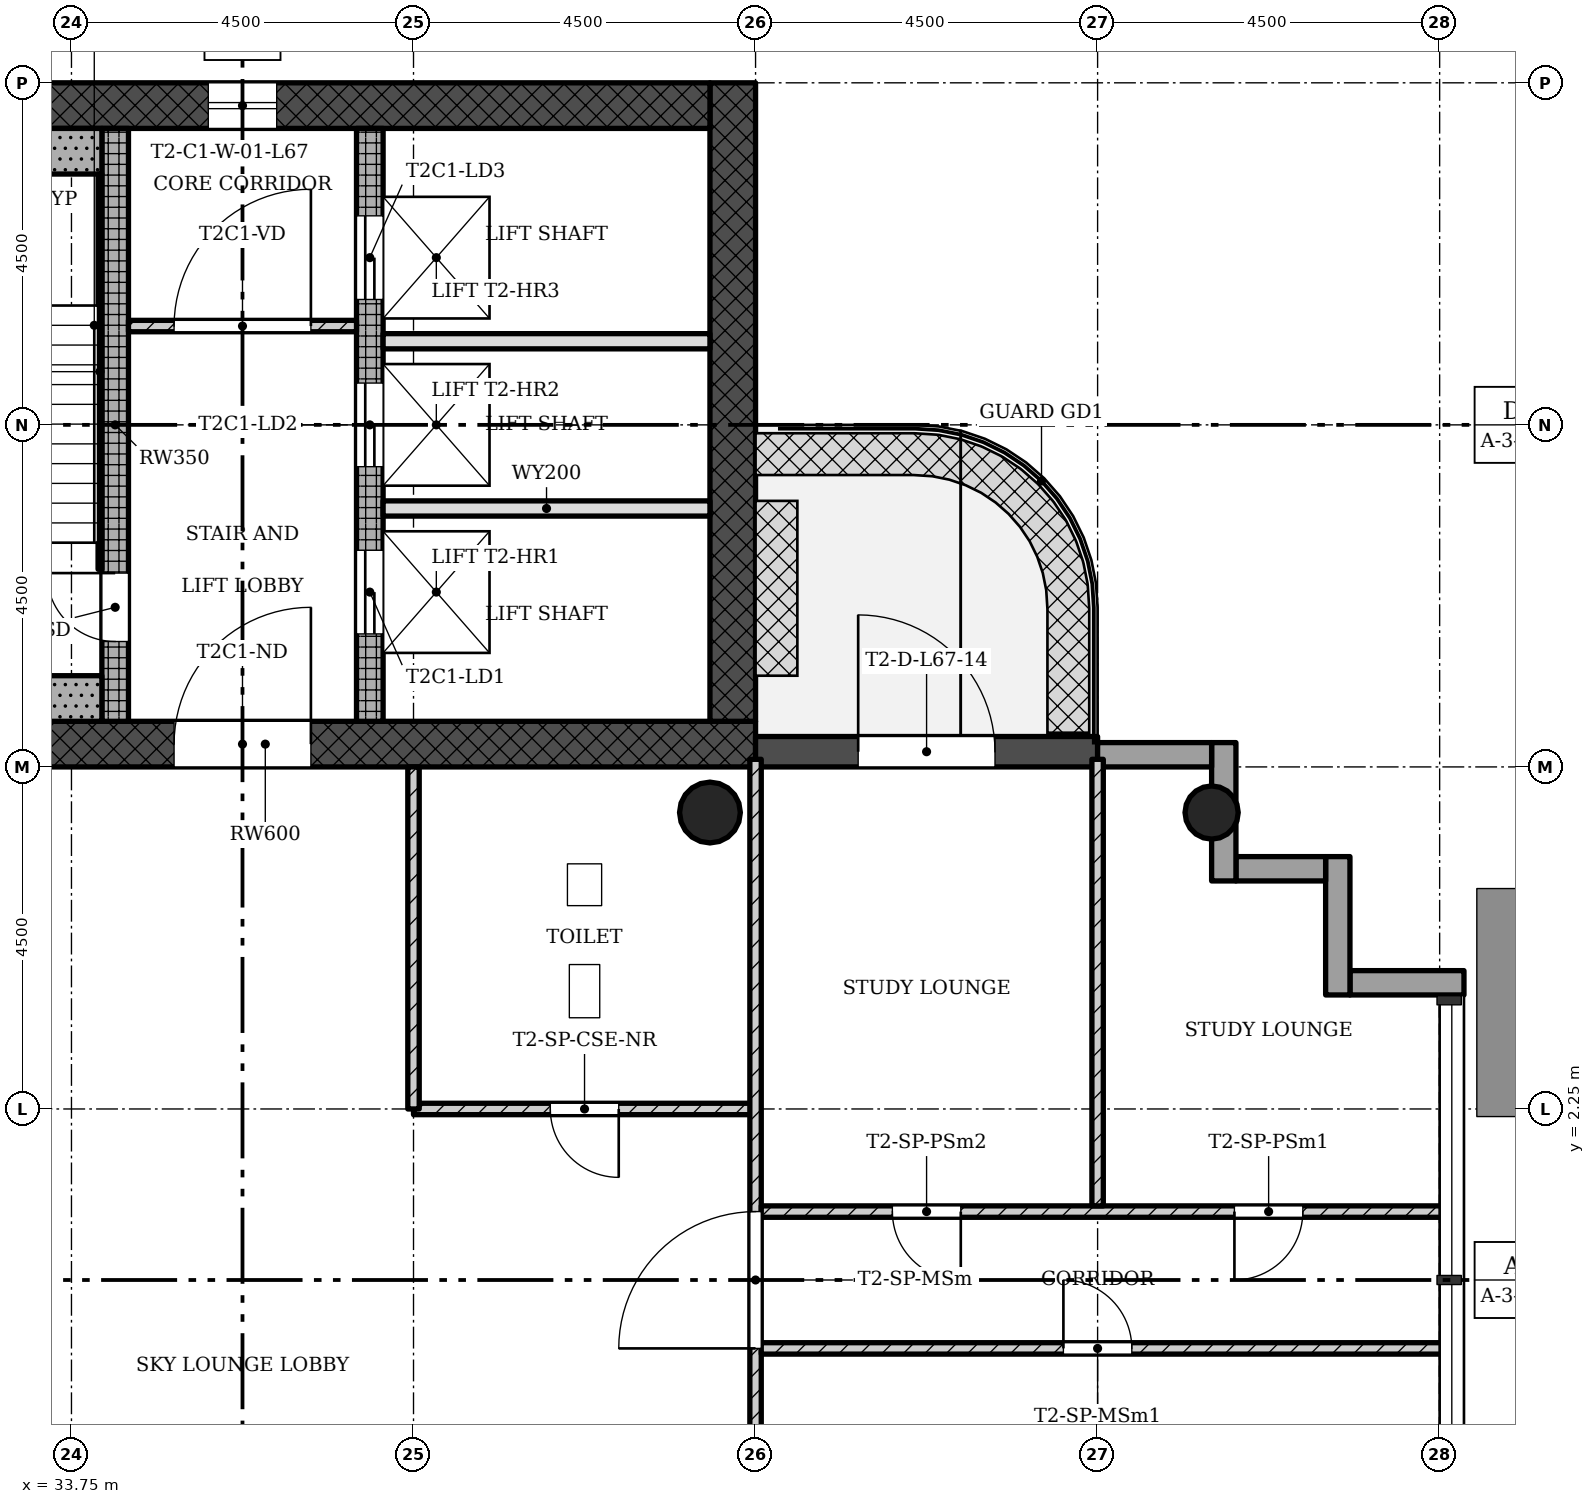
"""IFC4 building model, lengths in metres.
Left out: names, types, materials, properties, quantities, classifications, styles, units other than length and angle.
Written with IfcOpenShell. Run it as: python <this file> out.ifc"""

import sys

from ifc_helpers import new_model, si_unit, direction, frame, frame_2d, origin, origin_2d, place, context, subcontext, project, spatial, rectangle, hollow_circle, extrude, element, fill, save


model = new_model("IFC4")
c1 = context("Model", 3, precision=1e-05, world=origin(), true_north=direction((0.0, 1.0)))
c2 = subcontext(c1, "Body", "Model", "MODEL_VIEW")
j1 = project(units=[si_unit("LENGTHUNIT", "METRE"), si_unit("PLANEANGLEUNIT", "RADIAN")], contexts=[c1])
p1 = place(None, origin())
s1 = spatial("IfcSite", under=j1, at=p1, CompositionType="ELEMENT")
p2 = place(p1, origin())
s2 = spatial("IfcBuilding", under=s1, at=p2, CompositionType="ELEMENT")
p3 = place(p2, frame((0.0, 0.0, 242.4)))
s3 = spatial("IfcBuildingStorey", under=s2, at=p3, CompositionType="ELEMENT", Elevation=242.4)
p4 = place(p3, frame((29.85, 7.05, 0.0), z_axis=(0.0, 0.0, 1.0), x_axis=(1.0, 0.0, 0.0)))
e1 = element("IfcWall", 1, at=p4, inside=s3, PredefinedType="SHEAR", context=c2, shape_type="SweptSolid", body=[
    extrude(rectangle(XDim=12.9, YDim=0.6, at=frame_2d((6.45, 0.0))), origin(), (0.0, 0.0, 1.0), 4.5),
])
p5 = place(p4, frame((5.25, 0.0, 0.0)))
e2 = element("IfcOpeningElement", 2, at=p5, cuts=e1, PredefinedType="OPENING", context=c2, shape_type="SweptSolid", body=[
    extrude(rectangle(XDim=1.8, YDim=2.1, at=frame_2d((0.9, 1.05))), frame((0.0, 0.31, 0.0), z_axis=(0.0, -1.0, 0.0), x_axis=(1.0, 0.0, 0.0)), (0.0, 0.0, 1.0), 0.62),
])
p6 = place(p3, frame((42.45, 7.35, 0.0), z_axis=(0.0, 0.0, 1.0), x_axis=(0.0, 1.0, 0.0)))
e3 = element("IfcWall", 3, at=p6, inside=s3, PredefinedType="SHEAR", context=c2, shape_type="SweptSolid", body=[
    extrude(rectangle(XDim=8.4, YDim=0.6, at=frame_2d((4.2, 0.0))), origin(), (0.0, 0.0, 1.0), 4.5),
])
p7 = place(p3, frame((42.15, 15.45, 0.0), z_axis=(0.0, 0.0, 1.0), x_axis=(-1.0, 0.0, 0.0)))
e4 = element("IfcWall", 4, at=p7, inside=s3, PredefinedType="SHEAR", context=c2, shape_type="SweptSolid", body=[
    extrude(rectangle(XDim=12.9, YDim=0.6, at=frame_2d((6.45, 0.0))), origin(), (0.0, 0.0, 1.0), 4.5),
])
p8 = place(p7, frame((5.7, 0.0, 0.45)))
e5 = element("IfcOpeningElement", 5, at=p8, cuts=e4, PredefinedType="OPENING", context=c2, shape_type="SweptSolid", body=[
    extrude(rectangle(XDim=0.9, YDim=2.4, at=frame_2d((0.45, 1.2))), frame((0.0, 0.31, 0.0), z_axis=(0.0, -1.0, 0.0), x_axis=(1.0, 0.0, 0.0)), (0.0, 0.0, 1.0), 0.62),
])
p9 = place(p3, frame((34.325, 7.35, 0.0), z_axis=(0.0, 0.0, 1.0), x_axis=(0.0, 1.0, 0.0)))
e6 = element("IfcWall", 6, at=p9, inside=s3, PredefinedType="SHEAR", context=c2, shape_type="SweptSolid", body=[
    extrude(rectangle(XDim=7.8, YDim=0.35, at=frame_2d((3.9, 0.0))), origin(), (0.0, 0.0, 1.0), 4.5),
])
p10 = place(p9, frame((1.05, 0.0, 0.0)))
e7 = element("IfcOpeningElement", 7, at=p10, cuts=e6, PredefinedType="OPENING", context=c2, shape_type="SweptSolid", body=[
    extrude(rectangle(XDim=0.9, YDim=2.1, at=frame_2d((0.45, 1.05))), frame((0.0, 0.185, 0.0), z_axis=(0.0, -1.0, 0.0), x_axis=(1.0, 0.0, 0.0)), (0.0, 0.0, 1.0), 0.37),
])
p11 = place(p3, frame((37.675, 7.35, 0.0), z_axis=(0.0, 0.0, 1.0), x_axis=(0.0, 1.0, 0.0)))
e8 = element("IfcWall", 8, at=p11, inside=s3, PredefinedType="SHEAR", context=c2, shape_type="SweptSolid", body=[
    extrude(rectangle(XDim=7.8, YDim=0.35, at=frame_2d((3.9, 0.0))), origin(), (0.0, 0.0, 1.0), 4.5),
])
p12 = place(p11, frame((1.15, 0.0, 0.0)))
e9 = element("IfcOpeningElement", 9, at=p12, cuts=e8, PredefinedType="OPENING", context=c2, shape_type="SweptSolid", body=[
    extrude(rectangle(XDim=1.1, YDim=2.1, at=frame_2d((0.55, 1.05))), frame((0.0, 0.185, 0.0), z_axis=(0.0, -1.0, 0.0), x_axis=(1.0, 0.0, 0.0)), (0.0, 0.0, 1.0), 0.37),
])
p13 = place(p11, frame((3.35, 0.0, 0.0)))
e10 = element("IfcOpeningElement", 10, at=p13, cuts=e8, PredefinedType="OPENING", context=c2, shape_type="SweptSolid", body=[
    extrude(rectangle(XDim=1.1, YDim=2.1, at=frame_2d((0.55, 1.05))), frame((0.0, 0.185, 0.0), z_axis=(0.0, -1.0, 0.0), x_axis=(1.0, 0.0, 0.0)), (0.0, 0.0, 1.0), 0.37),
])
p14 = place(p11, frame((5.55, 0.0, 0.0)))
e11 = element("IfcOpeningElement", 11, at=p14, cuts=e8, PredefinedType="OPENING", context=c2, shape_type="SweptSolid", body=[
    extrude(rectangle(XDim=1.1, YDim=2.1, at=frame_2d((0.55, 1.05))), frame((0.0, 0.185, 0.0), z_axis=(0.0, -1.0, 0.0), x_axis=(1.0, 0.0, 0.0)), (0.0, 0.0, 1.0), 0.37),
])
p15 = place(p3, frame((48.75, 6.15, 0.0), z_axis=(0.0, 0.0, 1.0), x_axis=(1.0, 0.0, 0.0)))
e12 = element("IfcColumn", 12, at=p15, inside=s3, PredefinedType="COLUMN", context=c2, shape_type="SweptSolid", body=[
    extrude(hollow_circle(Radius=0.35, WallThickness=0.025, at=origin_2d()), origin(), (0.0, 0.0, 1.0), 4.5),
])
p16 = place(p3, frame((42.15, 6.15, 0.0), z_axis=(0.0, 0.0, 1.0), x_axis=(1.0, 0.0, 0.0)))
e13 = element("IfcColumn", 13, at=p16, inside=s3, PredefinedType="COLUMN", context=c2, shape_type="SweptSolid", body=[
    extrude(hollow_circle(Radius=0.4, WallThickness=0.028, at=origin_2d()), origin(), (0.0, 0.0, 1.0), 4.5),
])
p17 = place(p3, frame((52.07, 3.91, -0.3), z_axis=(0.0, 0.0, 1.0), x_axis=(-1.0, 0.0, 0.0)))
e14 = element("IfcWall", 14, at=p17, inside=s3, PredefinedType="STANDARD", context=c2, shape_type="SweptSolid", body=[
    extrude(rectangle(XDim=1.5, YDim=0.32, at=frame_2d((0.75, 0.0))), origin(), (0.0, 0.0, 1.0), 4.5),
])
p18 = place(p3, frame((50.41, 3.75, -0.3), z_axis=(0.0, 0.0, 1.0), x_axis=(0.0, 1.0, 0.0)))
e15 = element("IfcWall", 15, at=p18, inside=s3, PredefinedType="STANDARD", context=c2, shape_type="SweptSolid", body=[
    extrude(rectangle(XDim=1.82, YDim=0.32, at=frame_2d((0.91, 0.0))), origin(), (0.0, 0.0, 1.0), 4.5),
])
p19 = place(p3, frame((50.25, 5.41, -0.3), z_axis=(0.0, 0.0, 1.0), x_axis=(-1.0, 0.0, 0.0)))
e16 = element("IfcWall", 16, at=p19, inside=s3, PredefinedType="STANDARD", context=c2, shape_type="SweptSolid", body=[
    extrude(rectangle(XDim=1.18, YDim=0.32, at=frame_2d((0.59, 0.0))), origin(), (0.0, 0.0, 1.0), 4.5),
])
p20 = place(p3, frame((48.91, 5.25, -0.3), z_axis=(0.0, 0.0, 1.0), x_axis=(0.0, 1.0, 0.0)))
e17 = element("IfcWall", 17, at=p20, inside=s3, PredefinedType="STANDARD", context=c2, shape_type="SweptSolid", body=[
    extrude(rectangle(XDim=1.82, YDim=0.32, at=frame_2d((0.91, 0.0))), origin(), (0.0, 0.0, 1.0), 4.5),
])
p21 = place(p3, frame((48.75, 6.91, -0.3), z_axis=(0.0, 0.0, 1.0), x_axis=(-1.0, 0.0, 0.0)))
e18 = element("IfcWall", 18, at=p21, inside=s3, PredefinedType="STANDARD", context=c2, shape_type="SweptSolid", body=[
    extrude(rectangle(XDim=1.5, YDim=0.32, at=frame_2d((0.75, 0.0))), origin(), (0.0, 0.0, 1.0), 4.5),
])
p22 = place(p3, frame((47.25, 6.95, -0.02), z_axis=(0.0, 0.0, 1.0), x_axis=(-1.0, 0.0, 0.0)))
e19 = element("IfcWall", 19, at=p22, inside=s3, PredefinedType="STANDARD", context=c2, shape_type="SweptSolid", body=[
    extrude(rectangle(XDim=4.5, YDim=0.4, at=frame_2d((2.25, 0.0))), origin(), (0.0, 0.0, 1.0), 4.22),
])
p23 = place(p22, frame((1.35, 0.0, 0.02)))
e20 = element("IfcOpeningElement", 20, at=p23, cuts=e19, PredefinedType="OPENING", context=c2, shape_type="SweptSolid", body=[
    extrude(rectangle(XDim=1.8, YDim=2.1, at=frame_2d((0.9, 1.05))), frame((0.0, 0.21, 0.0), z_axis=(0.0, -1.0, 0.0), x_axis=(1.0, 0.0, 0.0)), (0.0, 0.0, 1.0), 0.42),
])
p24 = place(p3, frame((37.5, 12.55, 0.0), z_axis=(0.0, 0.0, 1.0), x_axis=(-1.0, 0.0, 0.0)))
e21 = element("IfcWall", 21, at=p24, inside=s3, PredefinedType="PARTITIONING", context=c2, shape_type="SweptSolid", body=[
    extrude(rectangle(XDim=3.0, YDim=0.15, at=frame_2d((1.5, 0.0))), origin(), (0.0, 0.0, 1.0), 4.08),
])
p25 = place(p24, frame((0.6, 0.0, 0.0)))
e22 = element("IfcOpeningElement", 22, at=p25, cuts=e21, PredefinedType="OPENING", context=c2, shape_type="SweptSolid", body=[
    extrude(rectangle(XDim=1.8, YDim=2.1, at=frame_2d((0.9, 1.05))), frame((0.0, 0.085, 0.0), z_axis=(0.0, -1.0, 0.0), x_axis=(1.0, 0.0, 0.0)), (0.0, 0.0, 1.0), 0.17),
])
for number, where, z_axis, x_axis in (
    (23, (42.15, 10.15, 0.0), (0.0, 0.0, 1.0), (-1.0, 0.0, 0.0)),
    (24, (42.15, 12.35, 0.0), (0.0, 0.0, 1.0), (-1.0, 0.0, 0.0)),
):
    element("IfcWall", number, at=place(p3, frame(where, z_axis=z_axis, x_axis=x_axis)), inside=s3, PredefinedType="SOLIDWALL", context=c2, shape_type="SweptSolid", body=[
        extrude(rectangle(XDim=4.3, YDim=0.2, at=frame_2d((2.15, 0.0))), origin(), (0.0, 0.0, 1.0), 4.08),
    ])
p26 = place(p3, frame((42.75, 2.25, 0.0), z_axis=(0.0, 0.0, 1.0), x_axis=(-1.0, 0.0, 0.0)))
e25 = element("IfcWall", 25, at=p26, inside=s3, PredefinedType="PARTITIONING", context=c2, shape_type="SweptSolid", body=[
    extrude(rectangle(XDim=4.5, YDim=0.15, at=frame_2d((2.25, 0.0))), origin(), (0.0, 0.0, 1.0), 4.08),
])
p27 = place(p26, frame((1.8, 0.0, 0.0)))
e26 = element("IfcOpeningElement", 26, at=p27, cuts=e25, PredefinedType="OPENING", context=c2, shape_type="SweptSolid", body=[
    extrude(rectangle(XDim=0.9, YDim=2.1, at=frame_2d((0.45, 1.05))), frame((0.0, 0.085, 0.0), z_axis=(0.0, -1.0, 0.0), x_axis=(1.0, 0.0, 0.0)), (0.0, 0.0, 1.0), 0.17),
])
p28 = place(p3, frame((38.25, 2.25, 0.0), z_axis=(0.0, 0.0, 1.0), x_axis=(0.0, 1.0, 0.0)))
e27 = element("IfcWall", 27, at=p28, inside=s3, PredefinedType="PARTITIONING", context=c2, shape_type="SweptSolid", body=[
    extrude(rectangle(XDim=4.5, YDim=0.15, at=frame_2d((2.25, 0.0))), origin(), (0.0, 0.0, 1.0), 4.08),
])
p29 = place(p3, frame((42.75, -6.85, 0.0), z_axis=(0.0, 0.0, 1.0), x_axis=(0.0, 1.0, 0.0)))
e28 = element("IfcWall", 28, at=p29, inside=s3, PredefinedType="PARTITIONING", context=c2, shape_type="SweptSolid", body=[
    extrude(rectangle(XDim=13.7, YDim=0.15, at=frame_2d((6.85, 0.0))), origin(), (0.0, 0.0, 1.0), 4.08),
])
p30 = place(p29, frame((5.95, 0.0, 0.0)))
e29 = element("IfcOpeningElement", 29, at=p30, cuts=e28, PredefinedType="OPENING", context=c2, shape_type="SweptSolid", body=[
    extrude(rectangle(XDim=1.8, YDim=2.1, at=frame_2d((0.9, 1.05))), frame((0.0, 0.085, 0.0), z_axis=(0.0, -1.0, 0.0), x_axis=(1.0, 0.0, 0.0)), (0.0, 0.0, 1.0), 0.17),
])
p31 = place(p3, frame((51.85, 0.9, 0.0), z_axis=(0.0, 0.0, 1.0), x_axis=(-1.0, 0.0, 0.0)))
e30 = element("IfcWall", 30, at=p31, inside=s3, PredefinedType="PARTITIONING", context=c2, shape_type="SweptSolid", body=[
    extrude(rectangle(XDim=9.025, YDim=0.15, at=frame_2d((4.513, 0.0))), origin(), (0.0, 0.0, 1.0), 4.08),
])
p32 = place(p31, frame((1.9, 0.0, 0.0)))
e31 = element("IfcOpeningElement", 31, at=p32, cuts=e30, PredefinedType="OPENING", context=c2, shape_type="SweptSolid", body=[
    extrude(rectangle(XDim=0.9, YDim=2.1, at=frame_2d((0.45, 1.05))), frame((0.0, 0.085, 0.0), z_axis=(0.0, -1.0, 0.0), x_axis=(1.0, 0.0, 0.0)), (0.0, 0.0, 1.0), 0.17),
])
p33 = place(p31, frame((6.4, 0.0, 0.0)))
e32 = element("IfcOpeningElement", 32, at=p33, cuts=e30, PredefinedType="OPENING", context=c2, shape_type="SweptSolid", body=[
    extrude(rectangle(XDim=0.9, YDim=2.1, at=frame_2d((0.45, 1.05))), frame((0.0, 0.085, 0.0), z_axis=(0.0, -1.0, 0.0), x_axis=(1.0, 0.0, 0.0)), (0.0, 0.0, 1.0), 0.17),
])
p34 = place(p3, frame((47.25, 0.975, 0.0), z_axis=(0.0, 0.0, 1.0), x_axis=(0.0, 1.0, 0.0)))
e33 = element("IfcWall", 33, at=p34, inside=s3, PredefinedType="PARTITIONING", context=c2, shape_type="SweptSolid", body=[
    extrude(rectangle(XDim=5.875, YDim=0.15, at=frame_2d((2.938, 0.0))), origin(), (0.0, 0.0, 1.0), 4.08),
])
p35 = place(p3, frame((51.85, -0.9, 0.0), z_axis=(0.0, 0.0, 1.0), x_axis=(-1.0, 0.0, 0.0)))
e34 = element("IfcWall", 34, at=p35, inside=s3, PredefinedType="PARTITIONING", context=c2, shape_type="SweptSolid", body=[
    extrude(rectangle(XDim=9.025, YDim=0.15, at=frame_2d((4.513, 0.0))), origin(), (0.0, 0.0, 1.0), 4.08),
])
p36 = place(p35, frame((4.15, 0.0, 0.0)))
e35 = element("IfcOpeningElement", 35, at=p36, cuts=e34, PredefinedType="OPENING", context=c2, shape_type="SweptSolid", body=[
    extrude(rectangle(XDim=0.9, YDim=2.1, at=frame_2d((0.45, 1.05))), frame((0.0, 0.085, 0.0), z_axis=(0.0, -1.0, 0.0), x_axis=(1.0, 0.0, 0.0)), (0.0, 0.0, 1.0), 0.17),
])
for number, where, z_axis, x_axis in (
    (36, (34.15, 14.85, 0.0), (0.0, 0.0, 1.0), (-1.0, 0.0, 0.0)),
    (37, (34.15, 7.65, 0.0), (0.0, 0.0, 1.0), (-1.0, 0.0, 0.0)),
):
    element("IfcWall", number, at=place(p3, frame(where, z_axis=z_axis, x_axis=x_axis)), inside=s3, PredefinedType="SHEAR", context=c2, shape_type="SweptSolid", body=[
        extrude(rectangle(XDim=4.3, YDim=0.6, at=frame_2d((2.15, 0.0))), origin(), (0.0, 0.0, 1.0), 4.5),
    ])
p37 = place(p3, frame((34.125, 9.35, 0.0), z_axis=(0.0, 0.0, 1.0), x_axis=(0.0, 1.0, 0.0)))
e38 = element("IfcWall", 38, at=p37, inside=s3, PredefinedType="SHEAR", context=c2, shape_type="SweptSolid", body=[
    extrude(rectangle(XDim=5.2, YDim=0.05, at=frame_2d((2.6, 0.0))), origin(), (0.0, 0.0, 1.0), 4.5),
])
p38 = place(p23, origin())
e39 = element("IfcDoor", 39, at=p38, inside=s3, OperationType="SINGLE_SWING_RIGHT", PredefinedType="DOOR", context=c2, shape_type="SweptSolid", body=[
    extrude(rectangle(XDim=1.8, YDim=2.1, at=frame_2d((0.9, 1.05))), frame((0.0, 0.025, 0.0), z_axis=(0.0, -1.0, 0.0), x_axis=(1.0, 0.0, 0.0)), (0.0, 0.0, 1.0), 0.05),
])
fill(e20, e39)
p39 = place(p8, origin())
e40 = element("IfcWindow", 40, at=p39, inside=s3, PartitioningType="SINGLE_PANEL", PredefinedType="WINDOW", context=c2, shape_type="SweptSolid", body=[
    extrude(rectangle(XDim=0.9, YDim=2.4, at=frame_2d((0.45, 1.2))), frame((0.0, 0.03, 0.0), z_axis=(0.0, -1.0, 0.0), x_axis=(1.0, 0.0, 0.0)), (0.0, 0.0, 1.0), 0.06),
])
fill(e5, e40)
p40 = place(p25, origin())
e41 = element("IfcDoor", 41, at=p40, inside=s3, OperationType="SINGLE_SWING_LEFT", PredefinedType="DOOR", context=c2, shape_type="SweptSolid", body=[
    extrude(rectangle(XDim=1.8, YDim=2.1, at=frame_2d((0.9, 1.05))), frame((0.0, 0.025, 0.0), z_axis=(0.0, -1.0, 0.0), x_axis=(1.0, 0.0, 0.0)), (0.0, 0.0, 1.0), 0.05),
])
fill(e22, e41)
p41 = place(p27, origin())
e42 = element("IfcDoor", 42, at=p41, inside=s3, OperationType="SINGLE_SWING_RIGHT", PredefinedType="DOOR", context=c2, shape_type="SweptSolid", body=[
    extrude(rectangle(XDim=0.9, YDim=2.1, at=frame_2d((0.45, 1.05))), frame((0.0, 0.025, 0.0), z_axis=(0.0, -1.0, 0.0), x_axis=(1.0, 0.0, 0.0)), (0.0, 0.0, 1.0), 0.05),
])
fill(e26, e42)
p42 = place(p30, origin())
e43 = element("IfcDoor", 43, at=p42, inside=s3, OperationType="SINGLE_SWING_RIGHT", PredefinedType="DOOR", context=c2, shape_type="SweptSolid", body=[
    extrude(rectangle(XDim=1.8, YDim=2.1, at=frame_2d((0.9, 1.05))), frame((0.0, 0.025, 0.0), z_axis=(0.0, -1.0, 0.0), x_axis=(1.0, 0.0, 0.0)), (0.0, 0.0, 1.0), 0.05),
])
fill(e29, e43)
p43 = place(p32, origin())
e44 = element("IfcDoor", 44, at=p43, inside=s3, OperationType="SINGLE_SWING_LEFT", PredefinedType="DOOR", context=c2, shape_type="SweptSolid", body=[
    extrude(rectangle(XDim=0.9, YDim=2.1, at=frame_2d((0.45, 1.05))), frame((0.0, 0.025, 0.0), z_axis=(0.0, -1.0, 0.0), x_axis=(1.0, 0.0, 0.0)), (0.0, 0.0, 1.0), 0.05),
])
fill(e31, e44)
p44 = place(p33, origin())
e45 = element("IfcDoor", 45, at=p44, inside=s3, OperationType="SINGLE_SWING_RIGHT", PredefinedType="DOOR", context=c2, shape_type="SweptSolid", body=[
    extrude(rectangle(XDim=0.9, YDim=2.1, at=frame_2d((0.45, 1.05))), frame((0.0, 0.025, 0.0), z_axis=(0.0, -1.0, 0.0), x_axis=(1.0, 0.0, 0.0)), (0.0, 0.0, 1.0), 0.05),
])
fill(e32, e45)
p45 = place(p36, origin())
e46 = element("IfcDoor", 46, at=p45, inside=s3, OperationType="SINGLE_SWING_RIGHT", PredefinedType="DOOR", context=c2, shape_type="SweptSolid", body=[
    extrude(rectangle(XDim=0.9, YDim=2.1, at=frame_2d((0.45, 1.05))), frame((0.0, 0.025, 0.0), z_axis=(0.0, -1.0, 0.0), x_axis=(1.0, 0.0, 0.0)), (0.0, 0.0, 1.0), 0.05),
])
fill(e35, e46)
p46 = place(p10, origin())
e47 = element("IfcDoor", 47, at=p46, inside=s3, OperationType="SINGLE_SWING_LEFT", PredefinedType="DOOR", context=c2, shape_type="SweptSolid", body=[
    extrude(rectangle(XDim=0.9, YDim=2.1, at=frame_2d((0.45, 1.05))), frame((0.0, 0.025, 0.0), z_axis=(0.0, -1.0, 0.0), x_axis=(1.0, 0.0, 0.0)), (0.0, 0.0, 1.0), 0.05),
])
fill(e7, e47)
p47 = place(p12, origin())
e48 = element("IfcDoor", 48, at=p47, inside=s3, OperationType="SLIDING_TO_LEFT", PredefinedType="DOOR", context=c2, shape_type="SweptSolid", body=[
    extrude(rectangle(XDim=1.1, YDim=2.1, at=frame_2d((0.55, 1.05))), frame((0.0, 0.025, 0.0), z_axis=(0.0, -1.0, 0.0), x_axis=(1.0, 0.0, 0.0)), (0.0, 0.0, 1.0), 0.05),
])
fill(e9, e48)
p48 = place(p13, origin())
e49 = element("IfcDoor", 49, at=p48, inside=s3, OperationType="SLIDING_TO_LEFT", PredefinedType="DOOR", context=c2, shape_type="SweptSolid", body=[
    extrude(rectangle(XDim=1.1, YDim=2.1, at=frame_2d((0.55, 1.05))), frame((0.0, 0.025, 0.0), z_axis=(0.0, -1.0, 0.0), x_axis=(1.0, 0.0, 0.0)), (0.0, 0.0, 1.0), 0.05),
])
fill(e10, e49)
p49 = place(p14, origin())
e50 = element("IfcDoor", 50, at=p49, inside=s3, OperationType="SLIDING_TO_LEFT", PredefinedType="DOOR", context=c2, shape_type="SweptSolid", body=[
    extrude(rectangle(XDim=1.1, YDim=2.1, at=frame_2d((0.55, 1.05))), frame((0.0, 0.025, 0.0), z_axis=(0.0, -1.0, 0.0), x_axis=(1.0, 0.0, 0.0)), (0.0, 0.0, 1.0), 0.05),
])
fill(e11, e50)
p50 = place(p5, origin())
e51 = element("IfcDoor", 51, at=p50, inside=s3, OperationType="SINGLE_SWING_LEFT", PredefinedType="DOOR", context=c2, shape_type="SweptSolid", body=[
    extrude(rectangle(XDim=1.8, YDim=2.1, at=frame_2d((0.9, 1.05))), frame((0.0, 0.025, 0.0), z_axis=(0.0, -1.0, 0.0), x_axis=(1.0, 0.0, 0.0)), (0.0, 0.0, 1.0), 0.05),
])
fill(e2, e51)
save(model, sys.argv[1])
